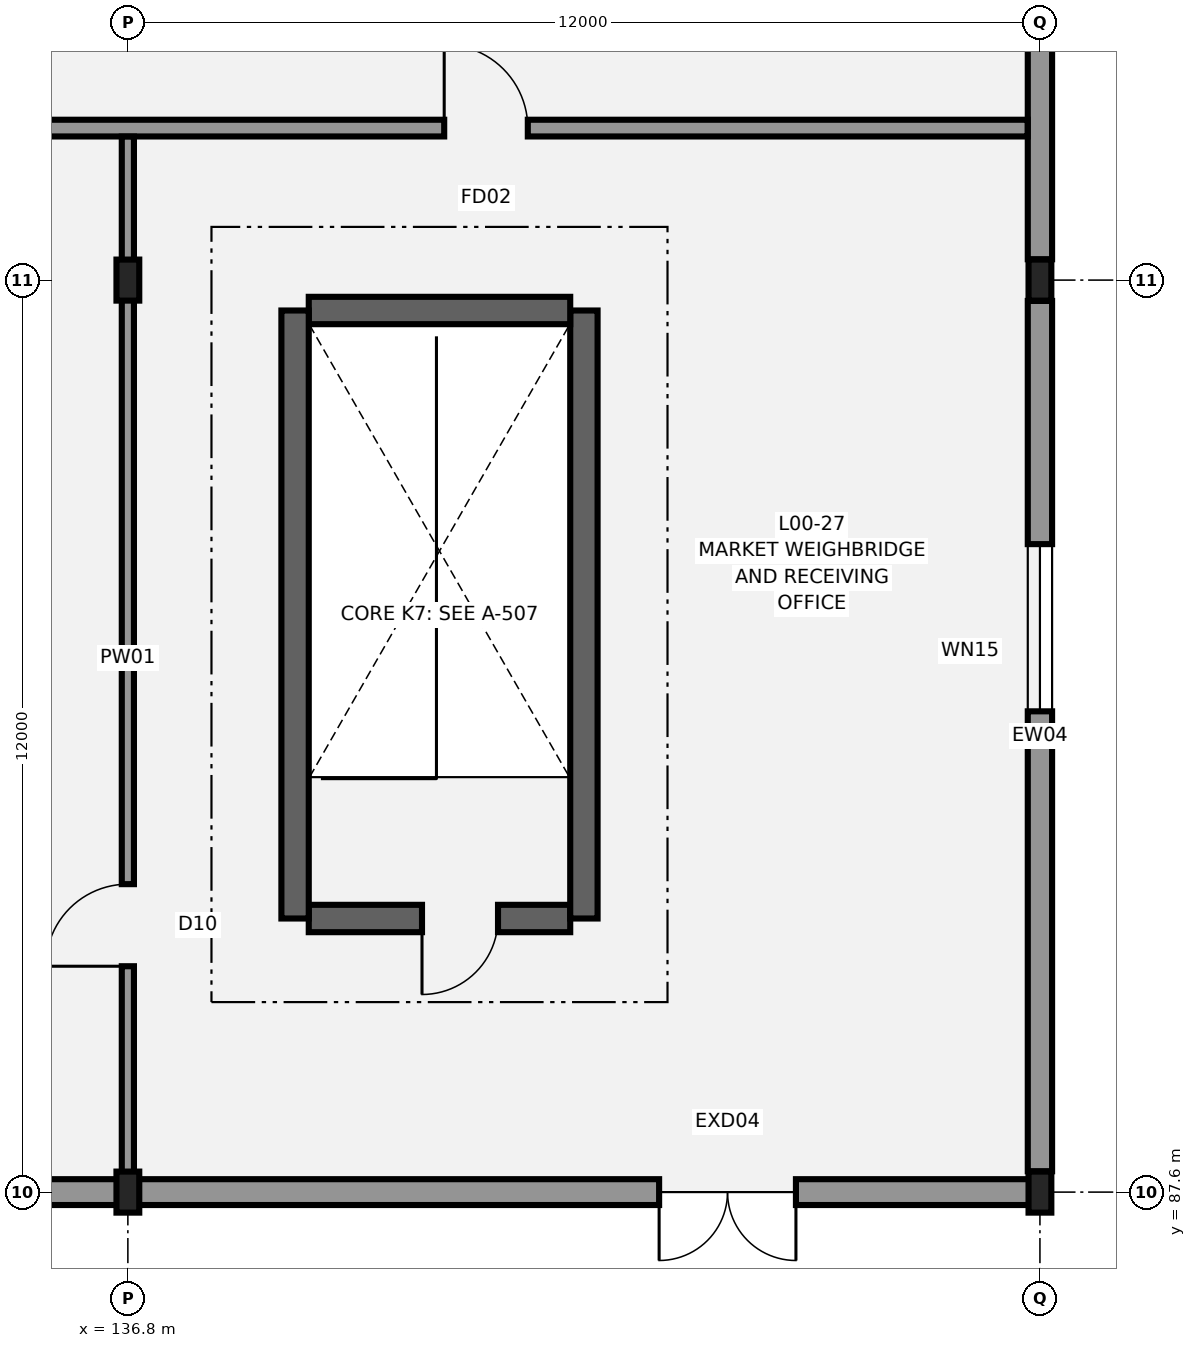
"""IFC4 building model, lengths in metres.
Left out: names, types, materials, properties, quantities, classifications, styles, units other than length and angle.
Written with IfcOpenShell. Run it as: python <this file> out.ifc"""

import sys

from ifc_helpers import new_model, si_unit, direction, frame, frame_2d, origin, origin_2d, place, context, subcontext, project, spatial, rectangle, i_section, extrude, element, fill, save


model = new_model("IFC4")
c1 = context("Model", 3, precision=1e-05, world=origin(), true_north=direction((0.0, 1.0)))
c2 = subcontext(c1, "Body", "Model", "MODEL_VIEW")
j1 = project(units=[si_unit("LENGTHUNIT", "METRE"), si_unit("PLANEANGLEUNIT", "RADIAN")], contexts=[c1])
p1 = place(None, origin())
s1 = spatial("IfcSite", under=j1, at=p1, CompositionType="ELEMENT")
p2 = place(p1, origin())
s2 = spatial("IfcBuilding", under=s1, at=p2, CompositionType="ELEMENT")
p3 = place(p2, origin())
s3 = spatial("IfcBuildingStorey", under=s2, at=p3, CompositionType="ELEMENT", Elevation=0.0)
for number, where, z_axis, x_axis in (
    (1, (136.8, 87.6, 0.0), (0.0, 0.0, 1.0), (1.0, 0.0, 0.0)),
    (2, (136.8, 99.6, 0.0), (0.0, 0.0, 1.0), (1.0, 0.0, 0.0)),
    (3, (148.8, 87.6, 0.0), (0.0, 0.0, 1.0), (1.0, 0.0, 0.0)),
    (4, (148.8, 99.6, 0.0), (0.0, 0.0, 1.0), (1.0, 0.0, 0.0)),
):
    element("IfcColumn", number, at=place(p3, frame(where, z_axis=z_axis, x_axis=x_axis)), inside=s3, PredefinedType="COLUMN", context=c2, shape_type="SweptSolid", body=[
        extrude(i_section(OverallWidth=0.3, OverallDepth=0.54, WebThickness=0.012, FlangeThickness=0.024, FilletRadius=0.027, at=origin_2d()), origin(), (0.0, 0.0, 1.0), 6.3),
    ])
p4 = place(p3, frame((142.62, 91.2, 0.0), z_axis=(0.0, 0.0, 1.0), x_axis=(-1.0, 0.0, 0.0)))
e5 = element("IfcWall", 5, at=p4, inside=s3, PredefinedType="SHEAR", context=c2, shape_type="SweptSolid", body=[
    extrude(rectangle(XDim=3.44, YDim=0.36, at=frame_2d((1.72, 0.0))), origin(), (0.0, 0.0, 1.0), 6.28),
])
p5 = place(p4, frame((0.95, 0.0, 0.0)))
e6 = element("IfcOpeningElement", 6, at=p5, cuts=e5, PredefinedType="OPENING", context=c2, shape_type="SweptSolid", body=[
    extrude(rectangle(XDim=1.0, YDim=2.15, at=frame_2d((0.5, 1.075))), frame((0.0, 0.19, 0.0), z_axis=(0.0, -1.0, 0.0), x_axis=(1.0, 0.0, 0.0)), (0.0, 0.0, 1.0), 0.38),
])
p6 = place(p3, frame((142.8, 91.2, 0.0), z_axis=(0.0, 0.0, 1.0), x_axis=(0.0, 1.0, 0.0)))
e7 = element("IfcWall", 7, at=p6, inside=s3, PredefinedType="SHEAR", context=c2, shape_type="SweptSolid", body=[
    extrude(rectangle(XDim=8.0, YDim=0.36, at=frame_2d((4.0, 0.0))), origin(), (0.0, 0.0, 1.0), 6.28),
])
p7 = place(p3, frame((142.62, 99.2, 0.0), z_axis=(0.0, 0.0, 1.0), x_axis=(-1.0, 0.0, 0.0)))
e8 = element("IfcWall", 8, at=p7, inside=s3, PredefinedType="SHEAR", context=c2, shape_type="SweptSolid", body=[
    extrude(rectangle(XDim=3.44, YDim=0.36, at=frame_2d((1.72, 0.0))), origin(), (0.0, 0.0, 1.0), 6.28),
])
p8 = place(p3, frame((139.0, 99.2, 0.0), z_axis=(0.0, 0.0, 1.0), x_axis=(0.0, -1.0, 0.0)))
e9 = element("IfcWall", 9, at=p8, inside=s3, PredefinedType="SHEAR", context=c2, shape_type="SweptSolid", body=[
    extrude(rectangle(XDim=8.0, YDim=0.36, at=frame_2d((4.0, 0.0))), origin(), (0.0, 0.0, 1.0), 6.28),
])
p9 = place(p3, frame((148.8, 99.326, 0.0), z_axis=(0.0, 0.0, 1.0), x_axis=(0.0, -1.0, 0.0)))
e10 = element("IfcWall", 10, at=p9, inside=s3, PredefinedType="STANDARD", context=c2, shape_type="SweptSolid", body=[
    extrude(rectangle(XDim=11.452, YDim=0.32, at=frame_2d((5.726, 0.0))), origin(), (0.0, 0.0, 1.0), 5.935),
])
p10 = place(p9, frame((3.2, 0.0, 2.2)))
e11 = element("IfcOpeningElement", 11, at=p10, cuts=e10, PredefinedType="OPENING", context=c2, shape_type="SweptSolid", body=[
    extrude(rectangle(XDim=2.2, YDim=1.4, at=frame_2d((1.1, 0.7))), frame((0.0, 0.17, 0.0), z_axis=(0.0, -1.0, 0.0), x_axis=(1.0, 0.0, 0.0)), (0.0, 0.0, 1.0), 0.34),
])
p11 = place(p3, frame((148.8, 111.326, 0.0), z_axis=(0.0, 0.0, 1.0), x_axis=(0.0, -1.0, 0.0)))
e12 = element("IfcWall", 12, at=p11, inside=s3, PredefinedType="STANDARD", context=c2, shape_type="SweptSolid", body=[
    extrude(rectangle(XDim=11.452, YDim=0.32, at=frame_2d((5.726, 0.0))), origin(), (0.0, 0.0, 1.0), 5.935),
])
p12 = place(p11, frame((3.8, 0.0, 0.0)))
e13 = element("IfcOpeningElement", 13, at=p12, cuts=e12, PredefinedType="OPENING", context=c2, shape_type="SweptSolid", body=[
    extrude(rectangle(XDim=3.6, YDim=4.2, at=frame_2d((1.8, 2.1))), frame((0.0, 0.17, 0.0), z_axis=(0.0, -1.0, 0.0), x_axis=(1.0, 0.0, 0.0)), (0.0, 0.0, 1.0), 0.34),
])
p13 = place(p3, frame((136.79, 87.6, 0.0), z_axis=(0.0, 0.0, 1.0), x_axis=(-1.0, 0.0, 0.0)))
e14 = element("IfcWall", 14, at=p13, inside=s3, PredefinedType="STANDARD", context=c2, shape_type="SweptSolid", body=[
    extrude(rectangle(XDim=11.979, YDim=0.34, at=frame_2d((5.99, 0.0))), origin(), (0.0, 0.0, 1.0), 5.935),
])
p14 = place(p13, frame((2.2, 0.0, 2.0)))
e15 = element("IfcOpeningElement", 15, at=p14, cuts=e14, PredefinedType="OPENING", context=c2, shape_type="SweptSolid", body=[
    extrude(rectangle(XDim=1.4, YDim=1.4, at=frame_2d((0.7, 0.7))), frame((0.0, 0.18, 0.0), z_axis=(0.0, -1.0, 0.0), x_axis=(1.0, 0.0, 0.0)), (0.0, 0.0, 1.0), 0.36),
])
p15 = place(p13, frame((6.4, 0.0, 2.0)))
e16 = element("IfcOpeningElement", 16, at=p15, cuts=e14, PredefinedType="OPENING", context=c2, shape_type="SweptSolid", body=[
    extrude(rectangle(XDim=1.8, YDim=1.4, at=frame_2d((0.9, 0.7))), frame((0.0, 0.18, 0.0), z_axis=(0.0, -1.0, 0.0), x_axis=(1.0, 0.0, 0.0)), (0.0, 0.0, 1.0), 0.36),
])
p16 = place(p3, frame((148.79, 87.6, 0.0), z_axis=(0.0, 0.0, 1.0), x_axis=(-1.0, 0.0, 0.0)))
e17 = element("IfcWall", 17, at=p16, inside=s3, PredefinedType="STANDARD", context=c2, shape_type="SweptSolid", body=[
    extrude(rectangle(XDim=11.979, YDim=0.34, at=frame_2d((5.99, 0.0))), origin(), (0.0, 0.0, 1.0), 5.935),
])
p17 = place(p16, frame((3.2, 0.0, 0.0)))
e18 = element("IfcOpeningElement", 18, at=p17, cuts=e17, PredefinedType="OPENING", context=c2, shape_type="SweptSolid", body=[
    extrude(rectangle(XDim=1.8, YDim=2.3, at=frame_2d((0.9, 1.15))), frame((0.0, 0.18, 0.0), z_axis=(0.0, -1.0, 0.0), x_axis=(1.0, 0.0, 0.0)), (0.0, 0.0, 1.0), 0.36),
])
p18 = place(p3, frame((76.962, 101.6, 0.0), z_axis=(0.0, 0.0, 1.0), x_axis=(1.0, 0.0, 0.0)))
e19 = element("IfcWall", 19, at=p18, inside=s3, PredefinedType="PARTITIONING", context=c2, shape_type="SweptSolid", body=[
    extrude(rectangle(XDim=71.676, YDim=0.22, at=frame_2d((35.838, 0.0))), origin(), (0.0, 0.0, 1.0), 6.2),
])
p19 = place(p18, frame((16.0, 0.0, 0.0)))
e20 = element("IfcOpeningElement", 20, at=p19, cuts=e19, PredefinedType="OPENING", context=c2, shape_type="SweptSolid", body=[
    extrude(rectangle(XDim=2.0, YDim=2.2, at=frame_2d((1.0, 1.1))), frame((0.0, 0.12, 0.0), z_axis=(0.0, -1.0, 0.0), x_axis=(1.0, 0.0, 0.0)), (0.0, 0.0, 1.0), 0.24),
])
p20 = place(p18, frame((42.0, 0.0, 0.0)))
e21 = element("IfcOpeningElement", 21, at=p20, cuts=e19, PredefinedType="OPENING", context=c2, shape_type="SweptSolid", body=[
    extrude(rectangle(XDim=1.8, YDim=2.2, at=frame_2d((0.9, 1.1))), frame((0.0, 0.12, 0.0), z_axis=(0.0, -1.0, 0.0), x_axis=(1.0, 0.0, 0.0)), (0.0, 0.0, 1.0), 0.24),
])
p21 = place(p18, frame((64.0, 0.0, 0.0)))
e22 = element("IfcOpeningElement", 22, at=p21, cuts=e19, PredefinedType="OPENING", context=c2, shape_type="SweptSolid", body=[
    extrude(rectangle(XDim=1.1, YDim=2.15, at=frame_2d((0.55, 1.075))), frame((0.0, 0.12, 0.0), z_axis=(0.0, -1.0, 0.0), x_axis=(1.0, 0.0, 0.0)), (0.0, 0.0, 1.0), 0.24),
])
p22 = place(p3, frame((136.8, 87.772, 0.0), z_axis=(0.0, 0.0, 1.0), x_axis=(0.0, 1.0, 0.0)))
e23 = element("IfcWall", 23, at=p22, inside=s3, PredefinedType="PARTITIONING", context=c2, shape_type="SweptSolid", body=[
    extrude(rectangle(XDim=13.716, YDim=0.16, at=frame_2d((6.858, 0.0))), origin(), (0.0, 0.0, 1.0), 5.935),
])
p23 = place(p22, frame((2.8, 0.0, 0.0)))
e24 = element("IfcOpeningElement", 24, at=p23, cuts=e23, PredefinedType="OPENING", context=c2, shape_type="SweptSolid", body=[
    extrude(rectangle(XDim=1.08, YDim=2.15, at=frame_2d((0.54, 1.075))), frame((0.0, 0.09, 0.0), z_axis=(0.0, -1.0, 0.0), x_axis=(1.0, 0.0, 0.0)), (0.0, 0.0, 1.0), 0.18),
])
p24 = place(p10, origin())
e25 = element("IfcWindow", 25, at=p24, inside=s3, PartitioningType="SINGLE_PANEL", PredefinedType="WINDOW", context=c2, shape_type="SweptSolid", body=[
    extrude(rectangle(XDim=2.2, YDim=1.4, at=frame_2d((1.1, 0.7))), frame((0.0, 0.03, 0.0), z_axis=(0.0, -1.0, 0.0), x_axis=(1.0, 0.0, 0.0)), (0.0, 0.0, 1.0), 0.06),
])
fill(e11, e25)
p25 = place(p17, origin())
e26 = element("IfcDoor", 26, at=p25, inside=s3, OperationType="DOUBLE_DOOR_SINGLE_SWING", PredefinedType="DOOR", context=c2, shape_type="SweptSolid", body=[
    extrude(rectangle(XDim=1.8, YDim=2.3, at=frame_2d((0.9, 1.15))), frame((0.0, 0.025, 0.0), z_axis=(0.0, -1.0, 0.0), x_axis=(1.0, 0.0, 0.0)), (0.0, 0.0, 1.0), 0.05),
])
fill(e18, e26)
p26 = place(p21, origin())
e27 = element("IfcDoor", 27, at=p26, inside=s3, OperationType="SINGLE_SWING_LEFT", PredefinedType="DOOR", context=c2, shape_type="SweptSolid", body=[
    extrude(rectangle(XDim=1.1, YDim=2.15, at=frame_2d((0.55, 1.075))), frame((0.0, 0.025, 0.0), z_axis=(0.0, -1.0, 0.0), x_axis=(1.0, 0.0, 0.0)), (0.0, 0.0, 1.0), 0.05),
])
fill(e22, e27)
p27 = place(p23, origin())
e28 = element("IfcDoor", 28, at=p27, inside=s3, OperationType="SINGLE_SWING_LEFT", PredefinedType="DOOR", context=c2, shape_type="SweptSolid", body=[
    extrude(rectangle(XDim=1.08, YDim=2.15, at=frame_2d((0.54, 1.075))), frame((0.0, 0.025, 0.0), z_axis=(0.0, -1.0, 0.0), x_axis=(1.0, 0.0, 0.0)), (0.0, 0.0, 1.0), 0.05),
])
fill(e24, e28)
p28 = place(p5, origin())
e29 = element("IfcDoor", 29, at=p28, inside=s3, OperationType="SINGLE_SWING_RIGHT", PredefinedType="DOOR", context=c2, shape_type="SweptSolid", body=[
    extrude(rectangle(XDim=1.0, YDim=2.15, at=frame_2d((0.5, 1.075))), frame((0.0, 0.025, 0.0), z_axis=(0.0, -1.0, 0.0), x_axis=(1.0, 0.0, 0.0)), (0.0, 0.0, 1.0), 0.05),
])
fill(e6, e29)
save(model, sys.argv[1])
